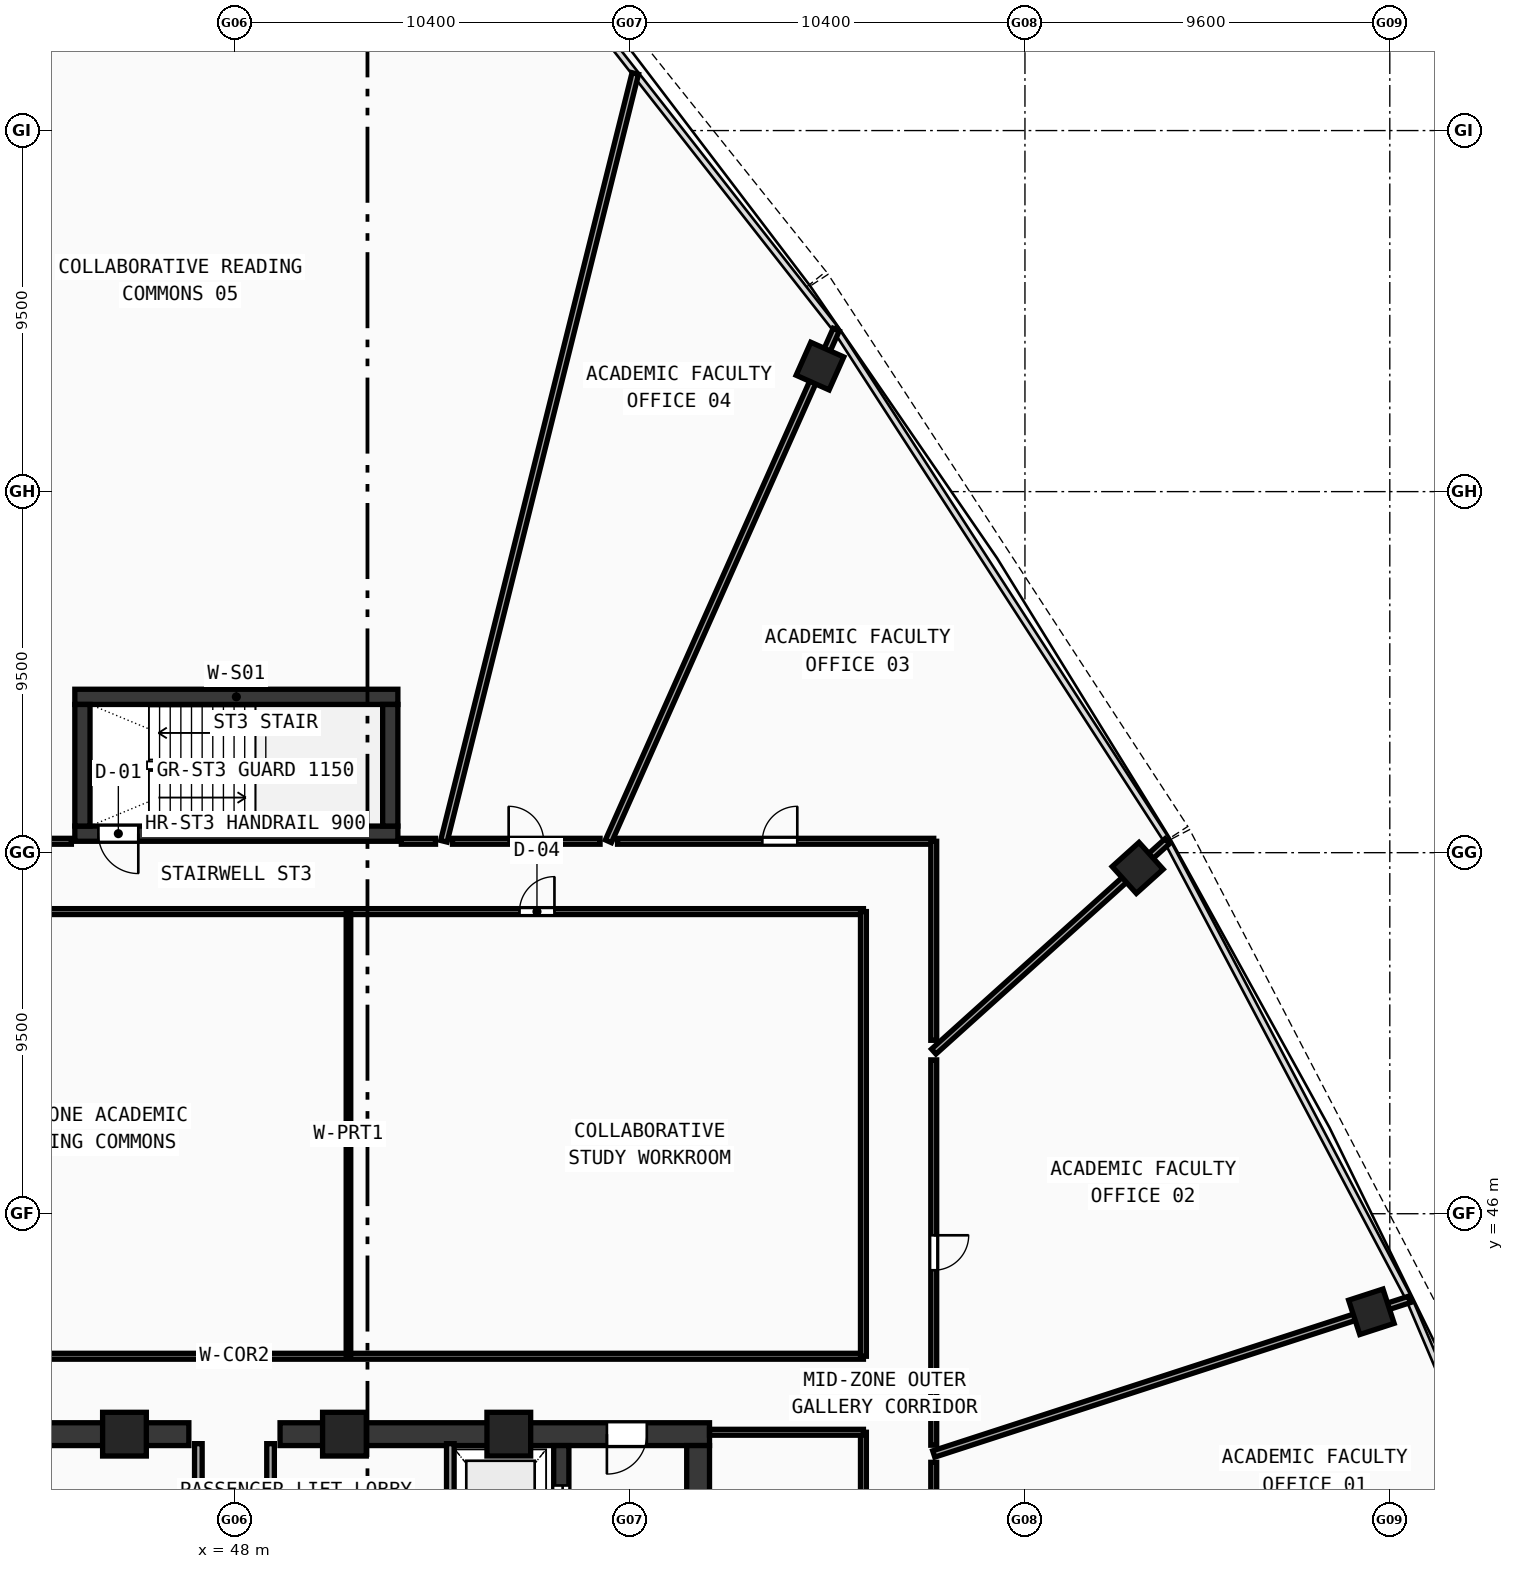
"""IFC4 building model, lengths in metres.
Left out: names, types, materials, properties, quantities, classifications, styles, units other than length and angle.
Written with IfcOpenShell. Run it as: python <this file> out.ifc"""

import sys

from ifc_helpers import new_model, si_unit, direction, frame, frame_2d, origin, origin_with_axes, origin_2d, place, context, subcontext, project, spatial, rectangle, hollow_rectangle, extrude, source, transform, mapped, element, fill, save


model = new_model("IFC4")
c1 = context("Model", 3, precision=1e-05, world=origin(), true_north=direction((0.0, 1.0)))
c2 = subcontext(c1, "Body", "Model", "MODEL_VIEW")
j1 = project(units=[si_unit("LENGTHUNIT", "METRE"), si_unit("PLANEANGLEUNIT", "RADIAN")], contexts=[c1])
p1 = place(None, origin())
s1 = spatial("IfcSite", under=j1, at=p1, CompositionType="ELEMENT")
p2 = place(p1, origin())
s2 = spatial("IfcBuilding", under=s1, at=p2, CompositionType="ELEMENT")
p3 = place(p2, frame((0.0, 0.0, 162.95)))
s3 = spatial("IfcBuildingStorey", under=s2, at=p3, CompositionType="ELEMENT", Elevation=162.95)
p4 = place(p3, frame((35.5, 40.2, 0.0), z_axis=(0.0, 0.0, 1.0), x_axis=(1.0, 0.0, 0.0)))
e1 = element("IfcWall", 1, at=p4, inside=s3, PredefinedType="SHEAR", context=c2, shape_type="SweptSolid", body=[
    extrude(rectangle(XDim=11.3, YDim=0.6, at=frame_2d((5.65, 0.0))), origin(), (0.0, 0.0, 1.0), 3.42),
])
p5 = place(p4, frame((1.65, 0.0, 0.0)))
e2 = element("IfcOpeningElement", 2, at=p5, cuts=e1, PredefinedType="OPENING", context=c2, shape_type="SweptSolid", body=[
    extrude(rectangle(XDim=1.05, YDim=2.1, at=frame_2d((0.525, 1.05))), frame((0.0, 0.31, 0.0), z_axis=(0.0, -1.0, 0.0), x_axis=(1.0, 0.0, 0.0)), (0.0, 0.0, 1.0), 0.62),
])
p6 = place(p3, frame((49.2, 40.2, 0.0), z_axis=(0.0, 0.0, 1.0), x_axis=(1.0, 0.0, 0.0)))
e3 = element("IfcWall", 3, at=p6, inside=s3, PredefinedType="SHEAR", context=c2, shape_type="SweptSolid", body=[
    extrude(rectangle(XDim=11.3, YDim=0.6, at=frame_2d((5.65, 0.0))), origin(), (0.0, 0.0, 1.0), 3.42),
])
p7 = place(p6, frame((8.6, 0.0, 0.0)))
e4 = element("IfcOpeningElement", 4, at=p7, cuts=e3, PredefinedType="OPENING", context=c2, shape_type="SweptSolid", body=[
    extrude(rectangle(XDim=1.05, YDim=2.1, at=frame_2d((0.525, 1.05))), frame((0.0, 0.31, 0.0), z_axis=(0.0, -1.0, 0.0), x_axis=(1.0, 0.0, 0.0)), (0.0, 0.0, 1.0), 0.62),
])
p8 = place(p3, frame((60.2, 27.8, 0.0), z_axis=(0.0, 0.0, 1.0), x_axis=(0.0, 1.0, 0.0)))
e5 = element("IfcWall", 5, at=p8, inside=s3, PredefinedType="SHEAR", context=c2, shape_type="SweptSolid", body=[
    extrude(rectangle(XDim=12.1, YDim=0.6, at=frame_2d((6.05, 0.0))), origin(), (0.0, 0.0, 1.0), 3.42),
])
p9 = place(p3, frame((56.6, 27.8, 0.0), z_axis=(0.0, 0.0, 1.0), x_axis=(0.0, 1.0, 0.0)))
e6 = element("IfcWall", 6, at=p9, inside=s3, PredefinedType="SHEAR", context=c2, shape_type="SweptSolid", body=[
    extrude(rectangle(XDim=12.1, YDim=0.4, at=frame_2d((6.05, 0.0))), origin(), (0.0, 0.0, 1.0), 3.42),
])
p10 = place(p9, frame((9.95, 0.0, 0.0)))
e7 = element("IfcOpeningElement", 7, at=p10, cuts=e6, PredefinedType="OPENING", context=c2, shape_type="SweptSolid", body=[
    extrude(rectangle(XDim=1.1, YDim=2.1, at=frame_2d((0.55, 1.05))), frame((0.0, 0.21, 0.0), z_axis=(0.0, -1.0, 0.0), x_axis=(1.0, 0.0, 0.0)), (0.0, 0.0, 1.0), 0.42),
])
p11 = place(p3, frame((43.8, 59.6, 0.0), z_axis=(0.0, 0.0, 1.0), x_axis=(1.0, 0.0, 0.0)))
e8 = element("IfcWall", 8, at=p11, inside=s3, PredefinedType="SHEAR", context=c2, shape_type="SweptSolid", body=[
    extrude(rectangle(XDim=8.5, YDim=0.4, at=frame_2d((4.25, 0.0))), origin(), (0.0, 0.0, 1.0), 3.42),
])
p12 = place(p3, frame((43.8, 56.0, 0.0), z_axis=(0.0, 0.0, 1.0), x_axis=(1.0, 0.0, 0.0)))
e9 = element("IfcWall", 9, at=p12, inside=s3, PredefinedType="SHEAR", context=c2, shape_type="SweptSolid", body=[
    extrude(rectangle(XDim=8.5, YDim=0.4, at=frame_2d((4.25, 0.0))), origin(), (0.0, 0.0, 1.0), 3.42),
])
p13 = place(p12, frame((0.62, 0.0, 0.0)))
e10 = element("IfcOpeningElement", 10, at=p13, cuts=e9, PredefinedType="OPENING", context=c2, shape_type="SweptSolid", body=[
    extrude(rectangle(XDim=1.05, YDim=2.1, at=frame_2d((0.525, 1.05))), frame((0.0, 0.21, 0.0), z_axis=(0.0, -1.0, 0.0), x_axis=(1.0, 0.0, 0.0)), (0.0, 0.0, 1.0), 0.42),
])
for number, where, z_axis, x_axis in (
    (11, (44.0, 56.2, 0.0), (0.0, 0.0, 1.0), (0.0, 1.0, 0.0)),
    (12, (52.1, 56.2, 0.0), (0.0, 0.0, 1.0), (0.0, 1.0, 0.0)),
):
    element("IfcWall", number, at=place(p3, frame(where, z_axis=z_axis, x_axis=x_axis)), inside=s3, PredefinedType="SHEAR", context=c2, shape_type="SweptSolid", body=[
        extrude(rectangle(XDim=3.2, YDim=0.4, at=frame_2d((1.6, 0.0))), origin(), (0.0, 0.0, 1.0), 3.42),
    ])
m1 = source(origin(), c2, "Body", "SweptSolid", [
    extrude(hollow_rectangle(XDim=1.15, YDim=1.15, WallThickness=0.048, at=origin_2d()), origin(), (0.0, 0.0, 1.0), 3.68),
])
for number, where, z_axis, x_axis in (
    (13, (55.219, 40.2, -0.26), (0.0, 0.0, 1.0), (1.0, 0.0, 0.0)),
    (14, (50.894, 40.2, -0.26), (0.0, 0.0, 1.0), (1.0, 0.0, 0.0)),
    (15, (45.106, 40.2, -0.26), (0.0, 0.0, 1.0), (1.0, 0.0, 0.0)),
):
    element("IfcColumn", number, at=place(p3, frame(where, z_axis=z_axis, x_axis=x_axis)), inside=s3, PredefinedType="COLUMN", context=c2, shape_type="MappedRepresentation", body=[
        mapped(m1, transform((0.0, 0.0, 0.0), scale=1.0)),
    ])
m2 = source(origin(), c2, "Body", "SweptSolid", [
    extrude(hollow_rectangle(XDim=0.95, YDim=0.95, WallThickness=0.04, at=origin_2d()), origin(), (0.0, 0.0, 1.0), 3.68),
])
for number, where, z_axis, x_axis in (
    (16, (77.915, 43.42, -0.26), (0.0, 0.0, 1.0), (-0.309, 0.951, 0.0)),
    (17, (71.766, 55.099, -0.26), (0.0, 0.0, 1.0), (-0.669, 0.743, 0.0)),
    (18, (63.406, 68.303, -0.26), (0.0, 0.0, 1.0), (-0.914, 0.407, 0.0)),
):
    element("IfcColumn", number, at=place(p3, frame(where, z_axis=z_axis, x_axis=x_axis)), inside=s3, PredefinedType="COLUMN", context=c2, shape_type="MappedRepresentation", body=[
        mapped(m2, transform((0.0, 0.0, 0.0), scale=1.0)),
    ])
p14 = place(p3, frame((53.68, 36.65, 0.0), z_axis=(0.0, 0.0, 1.0), x_axis=(0.0, 1.0, 0.0)))
e19 = element("IfcWall", 19, at=p14, inside=s3, PredefinedType="SOLIDWALL", context=c2, shape_type="SweptSolid", body=[
    extrude(rectangle(XDim=3.3, YDim=0.2, at=frame_2d((1.65, 0.0))), origin(), (0.0, 0.0, 1.0), 3.42),
])
for number, where, z_axis, x_axis in (
    (20, (47.05, 37.32, 0.0), (0.0, 0.0, 1.0), (0.0, 1.0, 0.0)),
    (21, (48.95, 37.32, 0.0), (0.0, 0.0, 1.0), (0.0, 1.0, 0.0)),
):
    element("IfcWall", number, at=place(p3, frame(where, z_axis=z_axis, x_axis=x_axis)), inside=s3, PredefinedType="SOLIDWALL", context=c2, shape_type="SweptSolid", body=[
        extrude(rectangle(XDim=2.63, YDim=0.2, at=frame_2d((1.315, 0.0))), origin(), (0.0, 0.0, 1.0), 3.42),
    ])
p15 = place(p3, frame((31.45, 42.25, 0.0), z_axis=(0.0, 0.0, 1.0), x_axis=(1.0, 0.0, 0.0)))
e22 = element("IfcWall", 22, at=p15, inside=s3, PredefinedType="PARTITIONING", context=c2, shape_type="SweptSolid", body=[
    extrude(rectangle(XDim=33.1, YDim=0.155, at=frame_2d((16.55, 0.0))), origin(), (0.0, 0.0, 1.0), 2.77),
])
p16 = place(p3, frame((31.45, 53.95, 0.0), z_axis=(0.0, 0.0, 1.0), x_axis=(1.0, 0.0, 0.0)))
e23 = element("IfcWall", 23, at=p16, inside=s3, PredefinedType="PARTITIONING", context=c2, shape_type="SweptSolid", body=[
    extrude(rectangle(XDim=33.1, YDim=0.155, at=frame_2d((16.55, 0.0))), origin(), (0.0, 0.0, 1.0), 2.77),
])
p17 = place(p16, frame((8.0, 0.0, 0.0)))
e24 = element("IfcOpeningElement", 24, at=p17, cuts=e23, PredefinedType="OPENING", context=c2, shape_type="SweptSolid", body=[
    extrude(rectangle(XDim=0.92, YDim=2.1, at=frame_2d((0.46, 1.05))), frame((0.0, 0.087, 0.0), z_axis=(0.0, -1.0, 0.0), x_axis=(1.0, 0.0, 0.0)), (0.0, 0.0, 1.0), 0.175),
])
p18 = place(p16, frame((24.05, 0.0, 0.0)))
e25 = element("IfcOpeningElement", 25, at=p18, cuts=e23, PredefinedType="OPENING", context=c2, shape_type="SweptSolid", body=[
    extrude(rectangle(XDim=0.92, YDim=2.1, at=frame_2d((0.46, 1.05))), frame((0.0, 0.087, 0.0), z_axis=(0.0, -1.0, 0.0), x_axis=(1.0, 0.0, 0.0)), (0.0, 0.0, 1.0), 0.175),
])
p19 = place(p3, frame((64.55, 42.25, 0.0), z_axis=(0.0, 0.0, 1.0), x_axis=(0.0, 1.0, 0.0)))
e26 = element("IfcWall", 26, at=p19, inside=s3, PredefinedType="PARTITIONING", context=c2, shape_type="SweptSolid", body=[
    extrude(rectangle(XDim=11.7, YDim=0.155, at=frame_2d((5.85, 0.0))), origin(), (0.0, 0.0, 1.0), 2.77),
])
p20 = place(p3, frame((51.0, 42.25, 0.0), z_axis=(0.0, 0.0, 1.0), x_axis=(0.0, 1.0, 0.0)))
e27 = element("IfcWall", 27, at=p20, inside=s3, PredefinedType="PARTITIONING", context=c2, shape_type="SweptSolid", body=[
    extrude(rectangle(XDim=11.7, YDim=0.12, at=frame_2d((5.85, 0.0))), origin(), (0.0, 0.0, 1.0), 3.02),
])
p21 = place(p3, frame((64.55, 23.65, 0.0), z_axis=(0.0, 0.0, 1.0), x_axis=(0.0, 1.0, 0.0)))
e28 = element("IfcWall", 28, at=p21, inside=s3, PredefinedType="PARTITIONING", context=c2, shape_type="SweptSolid", body=[
    extrude(rectangle(XDim=16.6, YDim=0.155, at=frame_2d((8.3, 0.0))), origin(), (0.0, 0.0, 1.0), 2.77),
])
p22 = place(p21, frame((7.5, 0.0, 0.0)))
e29 = element("IfcOpeningElement", 29, at=p22, cuts=e28, PredefinedType="OPENING", context=c2, shape_type="SweptSolid", body=[
    extrude(rectangle(XDim=0.9, YDim=2.08, at=frame_2d((0.45, 1.04))), frame((0.0, 0.087, 0.0), z_axis=(0.0, -1.0, 0.0), x_axis=(1.0, 0.0, 0.0)), (0.0, 0.0, 1.0), 0.175),
])
p23 = place(p3, frame((60.5, 40.25, 0.0), z_axis=(0.0, 0.0, 1.0), x_axis=(1.0, 0.0, 0.0)))
e30 = element("IfcWall", 30, at=p23, inside=s3, PredefinedType="PARTITIONING", context=c2, shape_type="SweptSolid", body=[
    extrude(rectangle(XDim=4.05, YDim=0.155, at=frame_2d((2.025, 0.0))), origin(), (0.0, 0.0, 1.0), 3.42),
])
p24 = place(p3, frame((66.4, 39.678, 0.0), z_axis=(0.0, 0.0, 1.0), x_axis=(0.951058745875, 0.309010132349, 0.0)))
e31 = element("IfcWall", 31, at=p24, inside=s3, PredefinedType="PARTITIONING", context=c2, shape_type="SweptSolid", body=[
    extrude(rectangle(XDim=13.158, YDim=0.175, at=frame_2d((6.579, 0.0))), origin(), (0.0, 0.0, 1.0), 2.77),
])
p25 = place(p3, frame((66.4, 50.267, 0.0), z_axis=(0.0, 0.0, 1.0), x_axis=(0.743138546471, 0.669137579836, 0.0)))
e32 = element("IfcWall", 32, at=p25, inside=s3, PredefinedType="PARTITIONING", context=c2, shape_type="SweptSolid", body=[
    extrude(rectangle(XDim=8.271, YDim=0.175, at=frame_2d((4.135, 0.0))), origin(), (0.0, 0.0, 1.0), 2.77),
])
p26 = place(p3, frame((57.84, 55.8, 0.0), z_axis=(0.0, 0.0, 1.0), x_axis=(0.406737891531, 0.913544901793, 0.0)))
e33 = element("IfcWall", 33, at=p26, inside=s3, PredefinedType="PARTITIONING", context=c2, shape_type="SweptSolid", body=[
    extrude(rectangle(XDim=14.736, YDim=0.175, at=frame_2d((7.368, 0.0))), origin(), (0.0, 0.0, 1.0), 2.77),
])
p27 = place(p3, frame((53.51, 55.8, 0.0), z_axis=(0.0, 0.0, 1.0), x_axis=(0.241934095485, 0.970292684422, 0.0)))
e34 = element("IfcWall", 34, at=p27, inside=s3, PredefinedType="PARTITIONING", context=c2, shape_type="SweptSolid", body=[
    extrude(rectangle(XDim=20.82, YDim=0.175, at=frame_2d((10.41, 0.0))), origin(), (0.0, 0.0, 1.0), 2.77),
])
p28 = place(p3, frame((38.38, 55.8, 0.0), z_axis=(0.0, 0.0, 1.0), x_axis=(1.0, 0.0, 0.0)))
e35 = element("IfcWall", 35, at=p28, inside=s3, PredefinedType="PARTITIONING", context=c2, shape_type="SweptSolid", body=[
    extrude(rectangle(XDim=5.329, YDim=0.155, at=frame_2d((2.665, 0.0))), origin(), (0.0, 0.0, 1.0), 2.77),
])
p29 = place(p28, frame((2.115, 0.0, 0.0)))
e36 = element("IfcOpeningElement", 36, at=p29, cuts=e35, PredefinedType="OPENING", context=c2, shape_type="SweptSolid", body=[
    extrude(rectangle(XDim=0.96, YDim=2.12, at=frame_2d((0.48, 1.06))), frame((0.0, 0.087, 0.0), z_axis=(0.0, -1.0, 0.0), x_axis=(1.0, 0.0, 0.0)), (0.0, 0.0, 1.0), 0.175),
])
p30 = place(p3, frame((52.391, 55.8, 0.0), z_axis=(0.0, 0.0, 1.0), x_axis=(1.0, 0.0, 0.0)))
e37 = element("IfcWall", 37, at=p30, inside=s3, PredefinedType="PARTITIONING", context=c2, shape_type="SweptSolid", body=[
    extrude(rectangle(XDim=0.899, YDim=0.155, at=frame_2d((0.45, 0.0))), origin(), (0.0, 0.0, 1.0), 3.42),
])
p31 = place(p3, frame((53.737, 55.8, 0.0), z_axis=(0.0, 0.0, 1.0), x_axis=(1.0, 0.0, 0.0)))
e38 = element("IfcWall", 38, at=p31, inside=s3, PredefinedType="PARTITIONING", context=c2, shape_type="SweptSolid", body=[
    extrude(rectangle(XDim=3.883, YDim=0.155, at=frame_2d((1.941, 0.0))), origin(), (0.0, 0.0, 1.0), 2.77),
])
p32 = place(p31, frame((1.478, 0.0, 0.0)))
e39 = element("IfcOpeningElement", 39, at=p32, cuts=e38, PredefinedType="OPENING", context=c2, shape_type="SweptSolid", body=[
    extrude(rectangle(XDim=0.92, YDim=2.1, at=frame_2d((0.46, 1.05))), frame((0.0, 0.087, 0.0), z_axis=(0.0, -1.0, 0.0), x_axis=(1.0, 0.0, 0.0)), (0.0, 0.0, 1.0), 0.175),
])
p33 = place(p3, frame((58.08, 55.8, 0.0), z_axis=(0.0, 0.0, 1.0), x_axis=(1.0, 0.0, 0.0)))
e40 = element("IfcWall", 40, at=p33, inside=s3, PredefinedType="PARTITIONING", context=c2, shape_type="SweptSolid", body=[
    extrude(rectangle(XDim=8.32, YDim=0.155, at=frame_2d((4.16, 0.0))), origin(), (0.0, 0.0, 1.0), 3.02),
])
p34 = place(p33, frame((3.809, 0.0, 0.0)))
e41 = element("IfcOpeningElement", 41, at=p34, cuts=e40, PredefinedType="OPENING", context=c2, shape_type="SweptSolid", body=[
    extrude(rectangle(XDim=0.92, YDim=2.1, at=frame_2d((0.46, 1.05))), frame((0.0, 0.087, 0.0), z_axis=(0.0, -1.0, 0.0), x_axis=(1.0, 0.0, 0.0)), (0.0, 0.0, 1.0), 0.175),
])
p35 = place(p3, frame((66.4, 55.8, 0.0), z_axis=(0.0, 0.0, 1.0), x_axis=(0.0, -1.0, 0.0)))
e42 = element("IfcWall", 42, at=p35, inside=s3, PredefinedType="PARTITIONING", context=c2, shape_type="SweptSolid", body=[
    extrude(rectangle(XDim=5.237, YDim=0.155, at=frame_2d((2.618, 0.0))), origin(), (0.0, 0.0, 1.0), 3.02),
])
p36 = place(p3, frame((66.4, 50.048, 0.0), z_axis=(0.0, 0.0, 1.0), x_axis=(0.0, -1.0, 0.0)))
e43 = element("IfcWall", 43, at=p36, inside=s3, PredefinedType="PARTITIONING", context=c2, shape_type="SweptSolid", body=[
    extrude(rectangle(XDim=10.138, YDim=0.155, at=frame_2d((5.069, 0.0))), origin(), (0.0, 0.0, 1.0), 2.77),
])
p37 = place(p36, frame((4.615, 0.0, 0.0)))
e44 = element("IfcOpeningElement", 44, at=p37, cuts=e43, PredefinedType="OPENING", context=c2, shape_type="SweptSolid", body=[
    extrude(rectangle(XDim=0.92, YDim=2.1, at=frame_2d((0.46, 1.05))), frame((0.0, 0.087, 0.0), z_axis=(0.0, -1.0, 0.0), x_axis=(1.0, 0.0, 0.0)), (0.0, 0.0, 1.0), 0.175),
])
p38 = place(p3, frame((66.4, 39.459, 0.0), z_axis=(0.0, 0.0, 1.0), x_axis=(0.0, -1.0, 0.0)))
e45 = element("IfcWall", 45, at=p38, inside=s3, PredefinedType="PARTITIONING", context=c2, shape_type="SweptSolid", body=[
    extrude(rectangle(XDim=4.251, YDim=0.155, at=frame_2d((2.126, 0.0))), origin(), (0.0, 0.0, 1.0), 3.42),
])
p39 = place(p38, frame((1.666, 0.0, 0.0)))
e46 = element("IfcOpeningElement", 46, at=p39, cuts=e45, PredefinedType="OPENING", context=c2, shape_type="SweptSolid", body=[
    extrude(rectangle(XDim=0.92, YDim=2.1, at=frame_2d((0.46, 1.05))), frame((0.0, 0.087, 0.0), z_axis=(0.0, -1.0, 0.0), x_axis=(1.0, 0.0, 0.0)), (0.0, 0.0, 1.0), 0.175),
])
m3 = source(origin(), c2, "Body", "SweptSolid", [
    extrude(rectangle(XDim=1.05, YDim=2.1, at=frame_2d((0.525, 1.05))), frame((0.0, 0.025, 0.0), z_axis=(0.0, -1.0, 0.0), x_axis=(1.0, 0.0, 0.0)), (0.0, 0.0, 1.0), 0.05),
])
p40 = place(p7, frame((1.05, 0.0, 0.0), z_axis=(0.0, 0.0, 1.0), x_axis=(-1.0, 0.0, 0.0)))
e47 = element("IfcDoor", 47, at=p40, inside=s3, OperationType="SINGLE_SWING_RIGHT", PredefinedType="DOOR", context=c2, shape_type="MappedRepresentation", body=[
    mapped(m3, transform((0.0, 0.0, 0.0), scale=1.0)),
])
fill(e4, e47)
m4 = source(origin(), c2, "Body", "SweptSolid", [
    extrude(rectangle(XDim=1.1, YDim=2.1, at=frame_2d((0.55, 1.05))), frame((0.0, 0.025, 0.0), z_axis=(0.0, -1.0, 0.0), x_axis=(1.0, 0.0, 0.0)), (0.0, 0.0, 1.0), 0.05),
])
p41 = place(p10, origin_with_axes())
e48 = element("IfcDoor", 48, at=p41, inside=s3, OperationType="DOUBLE_DOOR_SLIDING", PredefinedType="DOOR", context=c2, shape_type="MappedRepresentation", body=[
    mapped(m4, transform((0.0, 0.0, 0.0), scale=1.0)),
])
fill(e7, e48)
p42 = place(p13, frame((1.05, 0.0, 0.0), z_axis=(0.0, 0.0, 1.0), x_axis=(-1.0, 0.0, 0.0)))
e49 = element("IfcDoor", 49, at=p42, inside=s3, OperationType="SINGLE_SWING_LEFT", PredefinedType="DOOR", context=c2, shape_type="MappedRepresentation", body=[
    mapped(m3, transform((0.0, 0.0, 0.0), scale=1.0)),
])
fill(e10, e49)
m5 = source(origin(), c2, "Body", "SweptSolid", [
    extrude(rectangle(XDim=0.92, YDim=2.1, at=frame_2d((0.46, 1.05))), frame((0.0, 0.025, 0.0), z_axis=(0.0, -1.0, 0.0), x_axis=(1.0, 0.0, 0.0)), (0.0, 0.0, 1.0), 0.05),
])
p43 = place(p18, origin_with_axes())
e50 = element("IfcDoor", 50, at=p43, inside=s3, OperationType="SINGLE_SWING_RIGHT", PredefinedType="DOOR", context=c2, shape_type="MappedRepresentation", body=[
    mapped(m5, transform((0.0, 0.0, 0.0), scale=1.0)),
])
fill(e25, e50)
p44 = place(p37, origin_with_axes())
e51 = element("IfcDoor", 51, at=p44, inside=s3, OperationType="SINGLE_SWING_LEFT", PredefinedType="DOOR", context=c2, shape_type="MappedRepresentation", body=[
    mapped(m5, transform((0.0, 0.0, 0.0), scale=1.0)),
])
fill(e44, e51)
p45 = place(p34, origin_with_axes())
e52 = element("IfcDoor", 52, at=p45, inside=s3, OperationType="SINGLE_SWING_RIGHT", PredefinedType="DOOR", context=c2, shape_type="MappedRepresentation", body=[
    mapped(m5, transform((0.0, 0.0, 0.0), scale=1.0)),
])
fill(e41, e52)
p46 = place(p32, origin_with_axes())
e53 = element("IfcDoor", 53, at=p46, inside=s3, OperationType="SINGLE_SWING_LEFT", PredefinedType="DOOR", context=c2, shape_type="MappedRepresentation", body=[
    mapped(m5, transform((0.0, 0.0, 0.0), scale=1.0)),
])
fill(e39, e53)
save(model, sys.argv[1])
